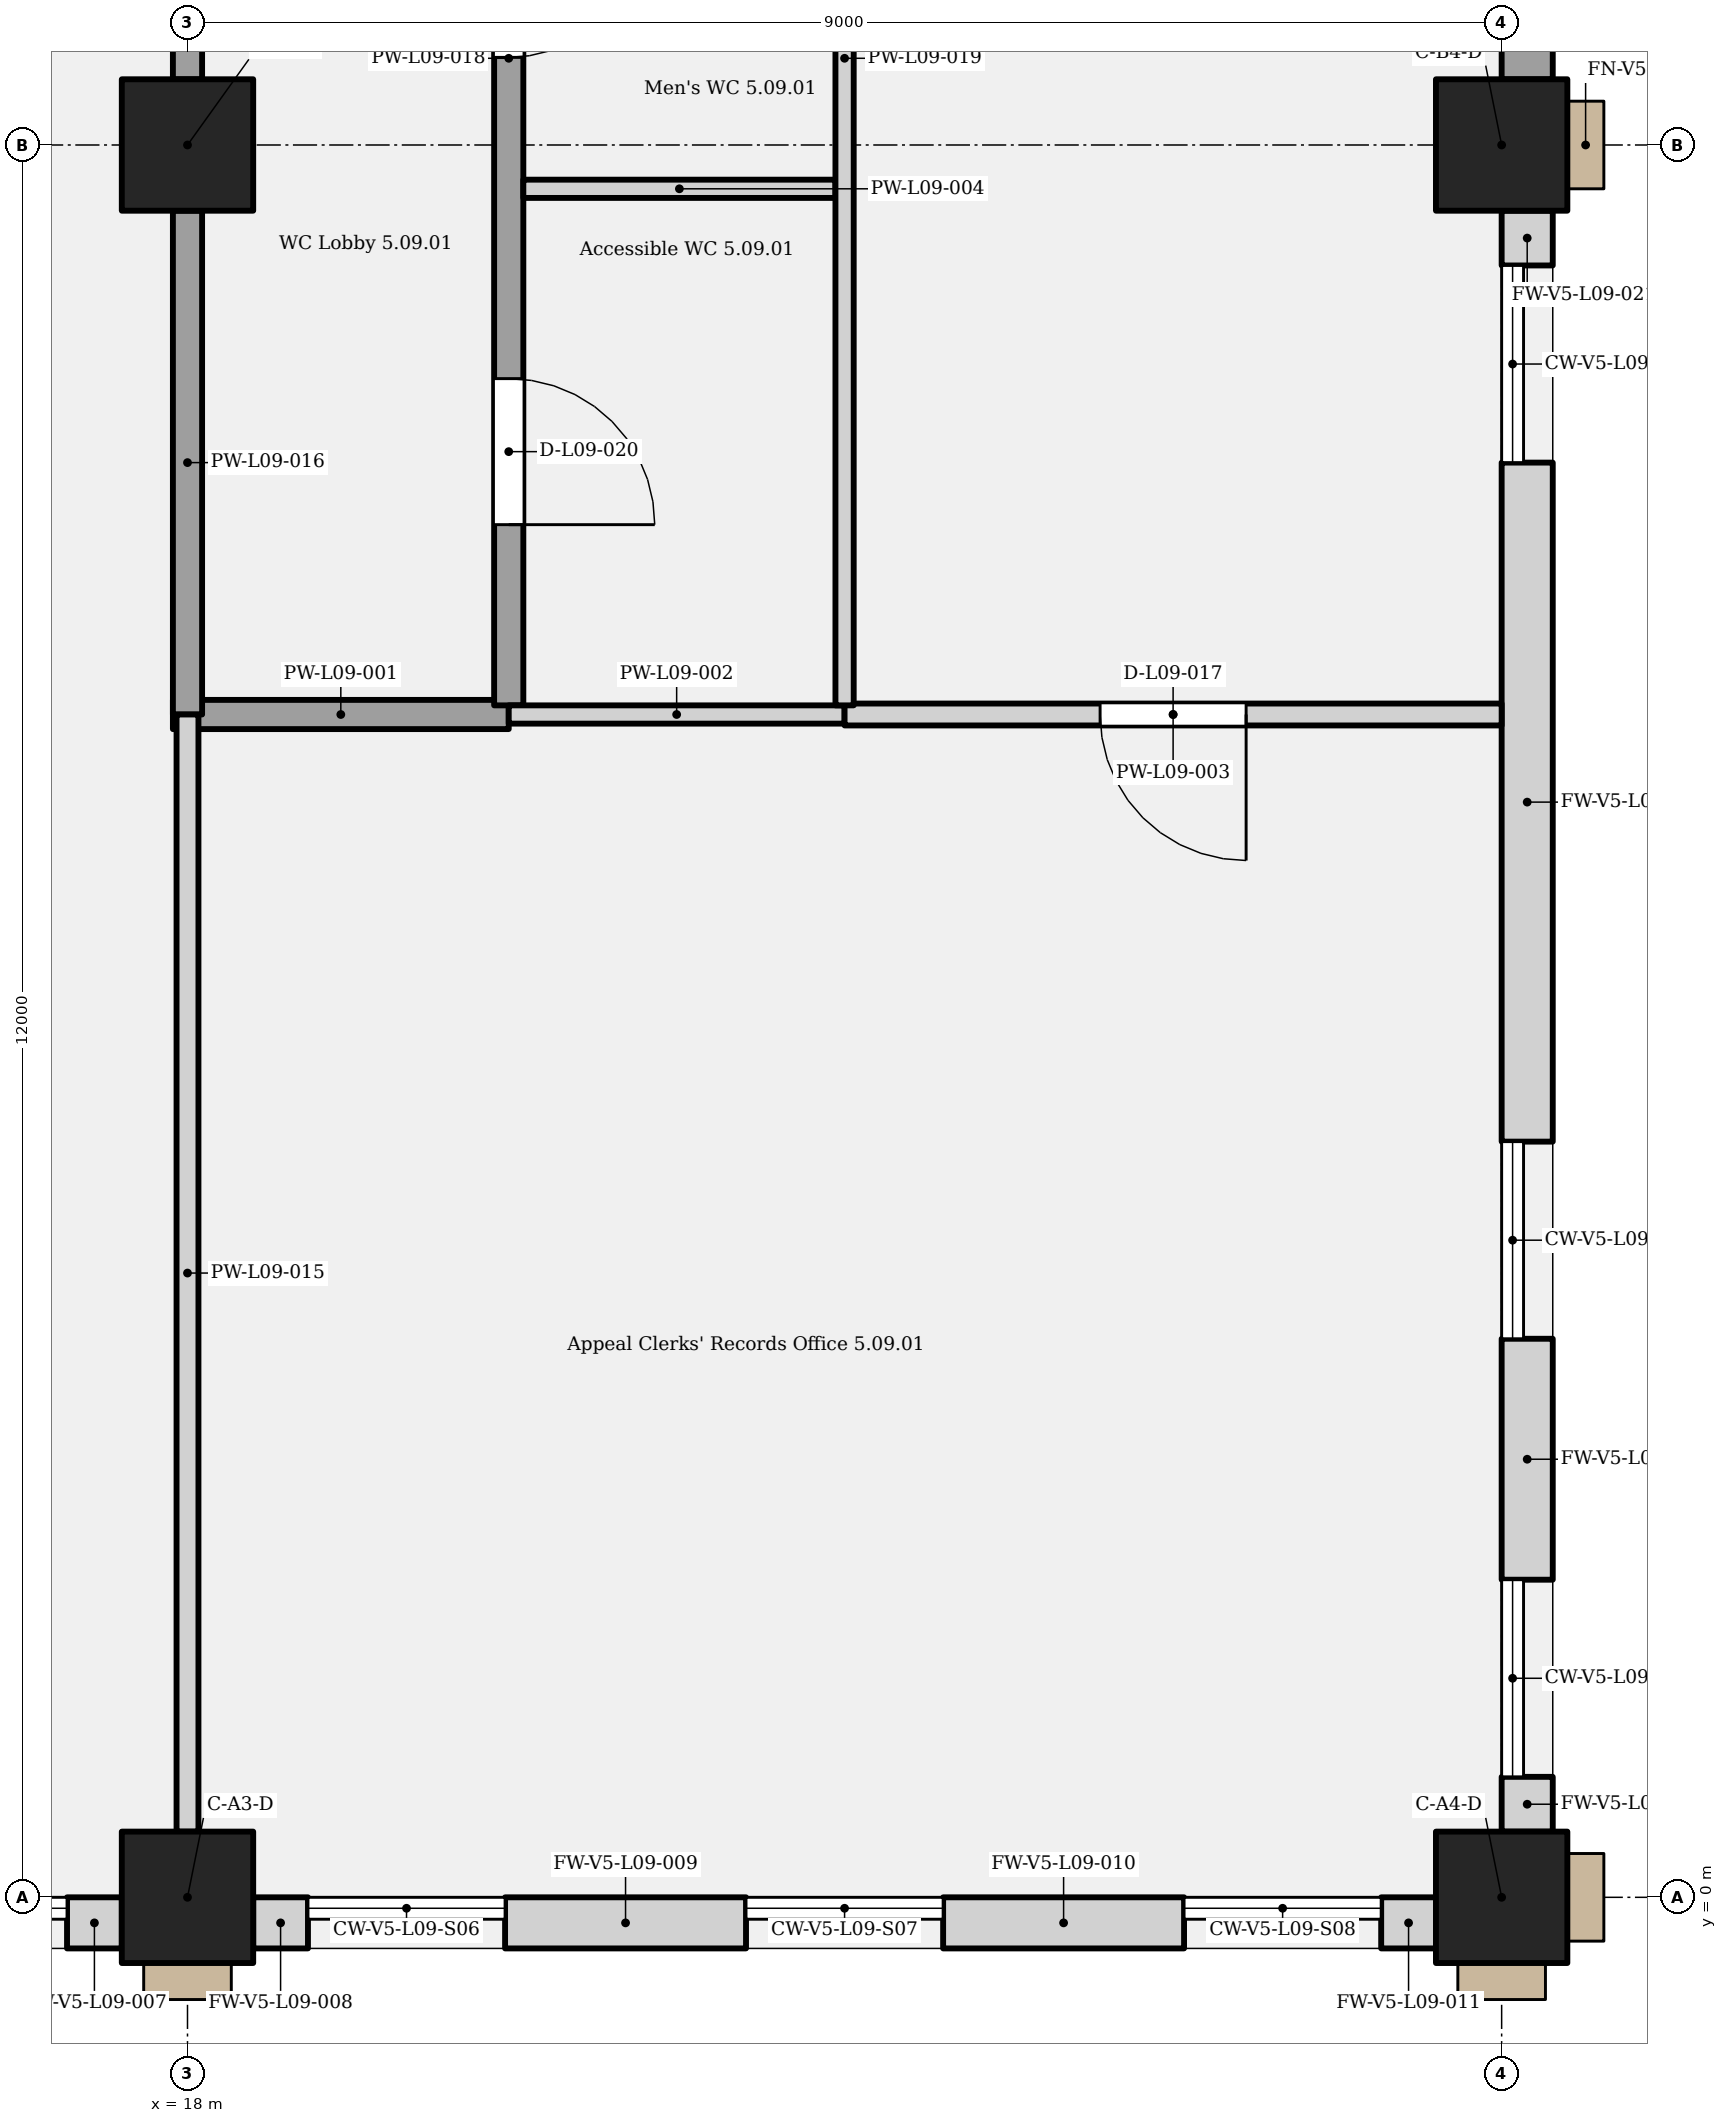
"""IFC4 building model, lengths in metres.
Left out: names, types, materials, properties, quantities, classifications, styles, units other than length and angle.
Written with IfcOpenShell. Run it as: python <this file> out.ifc"""

import sys

from ifc_helpers import new_model, si_unit, direction, frame, frame_2d, origin, origin_2d, place, context, subcontext, project, spatial, rectangle, extrude, element, fill, save


model = new_model("IFC4")
c1 = context("Model", 3, precision=1e-05, world=origin(), true_north=direction((0.0, 1.0)))
c2 = subcontext(c1, "Body", "Model", "MODEL_VIEW")
j1 = project(units=[si_unit("LENGTHUNIT", "METRE"), si_unit("PLANEANGLEUNIT", "RADIAN")], contexts=[c1])
p1 = place(None, origin())
s1 = spatial("IfcSite", under=j1, at=p1, CompositionType="ELEMENT")
p2 = place(p1, origin())
s2 = spatial("IfcBuilding", under=s1, at=p2, CompositionType="ELEMENT")
p3 = place(p2, frame((0.0, 0.0, 48.9)))
s3 = spatial("IfcBuildingStorey", under=s2, at=p3, CompositionType="ELEMENT", Elevation=48.9)
for number, where, z_axis, x_axis in (
    (1, (18.0, 0.0, 0.0), (0.0, 0.0, 1.0), (1.0, 0.0, 0.0)),
    (2, (27.0, 0.0, 0.0), (0.0, 0.0, 1.0), (1.0, 0.0, 0.0)),
    (3, (18.0, 12.0, 0.0), (0.0, 0.0, 1.0), (1.0, 0.0, 0.0)),
    (4, (27.0, 12.0, 0.0), (0.0, 0.0, 1.0), (1.0, 0.0, 0.0)),
):
    element("IfcColumn", number, at=place(p3, frame(where, z_axis=z_axis, x_axis=x_axis)), inside=s3, PredefinedType="COLUMN", context=c2, shape_type="SweptSolid", body=[
        extrude(rectangle(XDim=0.9, YDim=0.9, at=origin_2d()), origin(), (0.0, 0.0, 1.0), 4.5),
    ])
for number, where, z_axis, x_axis in (
    (5, (17.175, -0.175, 0.0), (0.0, 0.0, 1.0), (1.0, 0.0, 0.0)),
    (6, (18.45, -0.175, 0.0), (0.0, 0.0, 1.0), (1.0, 0.0, 0.0)),
):
    element("IfcWall", number, at=place(p3, frame(where, z_axis=z_axis, x_axis=x_axis)), inside=s3, PredefinedType="SOLIDWALL", context=c2, shape_type="SweptSolid", body=[
        extrude(rectangle(XDim=0.375, YDim=0.35, at=frame_2d((0.188, 0.0))), origin(), (0.0, 0.0, 1.0), 4.25),
    ])
for number, where, z_axis, x_axis in (
    (7, (20.175, -0.175, 0.0), (0.0, 0.0, 1.0), (1.0, 0.0, 0.0)),
    (8, (23.175, -0.175, 0.0), (0.0, 0.0, 1.0), (1.0, 0.0, 0.0)),
):
    element("IfcWall", number, at=place(p3, frame(where, z_axis=z_axis, x_axis=x_axis)), inside=s3, PredefinedType="SOLIDWALL", context=c2, shape_type="SweptSolid", body=[
        extrude(rectangle(XDim=1.65, YDim=0.35, at=frame_2d((0.825, 0.0))), origin(), (0.0, 0.0, 1.0), 4.25),
    ])
for number, where, z_axis, x_axis in (
    (9, (26.175, -0.175, 0.0), (0.0, 0.0, 1.0), (1.0, 0.0, 0.0)),
    (10, (27.175, 0.45, 0.0), (0.0, 0.0, 1.0), (0.0, 1.0, 0.0)),
):
    element("IfcWall", number, at=place(p3, frame(where, z_axis=z_axis, x_axis=x_axis)), inside=s3, PredefinedType="SOLIDWALL", context=c2, shape_type="SweptSolid", body=[
        extrude(rectangle(XDim=0.375, YDim=0.35, at=frame_2d((0.188, 0.0))), origin(), (0.0, 0.0, 1.0), 4.25),
    ])
p4 = place(p3, frame((27.175, 2.175, 0.0), z_axis=(0.0, 0.0, 1.0), x_axis=(0.0, 1.0, 0.0)))
e11 = element("IfcWall", 11, at=p4, inside=s3, PredefinedType="SOLIDWALL", context=c2, shape_type="SweptSolid", body=[
    extrude(rectangle(XDim=1.65, YDim=0.35, at=frame_2d((0.825, 0.0))), origin(), (0.0, 0.0, 1.0), 4.25),
])
p5 = place(p3, frame((27.175, 5.175, 0.0), z_axis=(0.0, 0.0, 1.0), x_axis=(0.0, 1.0, 0.0)))
e12 = element("IfcWall", 12, at=p5, inside=s3, PredefinedType="SOLIDWALL", context=c2, shape_type="SweptSolid", body=[
    extrude(rectangle(XDim=4.65, YDim=0.35, at=frame_2d((2.325, 0.0))), origin(), (0.0, 0.0, 1.0), 4.25),
])
p6 = place(p3, frame((27.175, 11.175, 0.0), z_axis=(0.0, 0.0, 1.0), x_axis=(0.0, 1.0, 0.0)))
e13 = element("IfcWall", 13, at=p6, inside=s3, PredefinedType="SOLIDWALL", context=c2, shape_type="SweptSolid", body=[
    extrude(rectangle(XDim=0.375, YDim=0.35, at=frame_2d((0.188, 0.0))), origin(), (0.0, 0.0, 1.0), 4.25),
])
p7 = place(p3, frame((27.175, 12.45, 0.0), z_axis=(0.0, 0.0, 1.0), x_axis=(0.0, 1.0, 0.0)))
e14 = element("IfcWall", 14, at=p7, inside=s3, PredefinedType="SOLIDWALL", context=c2, shape_type="SweptSolid", body=[
    extrude(rectangle(XDim=0.525, YDim=0.35, at=frame_2d((0.263, 0.0))), origin(), (0.0, 0.0, 1.0), 4.25),
])
p8 = place(p3, frame((17.9, 8.1, 0.0), z_axis=(0.0, 0.0, 1.0), x_axis=(1.0, 0.0, 0.0)))
e15 = element("IfcWall", 15, at=p8, inside=s3, PredefinedType="PARTITIONING", context=c2, shape_type="SweptSolid", body=[
    extrude(rectangle(XDim=2.3, YDim=0.2, at=frame_2d((1.15, 0.0))), origin(), (0.0, 0.0, 1.0), 4.25),
])
p9 = place(p3, frame((20.2, 8.1, 0.0), z_axis=(0.0, 0.0, 1.0), x_axis=(1.0, 0.0, 0.0)))
e16 = element("IfcWall", 16, at=p9, inside=s3, PredefinedType="PARTITIONING", context=c2, shape_type="SweptSolid", body=[
    extrude(rectangle(XDim=2.3, YDim=0.125, at=frame_2d((1.15, 0.0))), origin(), (0.0, 0.0, 1.0), 4.25),
])
p10 = place(p3, frame((22.5, 8.1, 0.0), z_axis=(0.0, 0.0, 1.0), x_axis=(1.0, 0.0, 0.0)))
e17 = element("IfcWall", 17, at=p10, inside=s3, PredefinedType="PARTITIONING", context=c2, shape_type="SweptSolid", body=[
    extrude(rectangle(XDim=4.5, YDim=0.15, at=frame_2d((2.25, 0.0))), origin(), (0.0, 0.0, 1.0), 4.25),
])
p11 = place(p10, frame((2.75, 0.0, 0.0), z_axis=(0.0, 0.0, 1.0), x_axis=(-1.0, 0.0, 0.0)))
e18 = element("IfcOpeningElement", 18, at=p11, cuts=e17, PredefinedType="OPENING", context=c2, shape_type="SweptSolid", body=[
    extrude(rectangle(XDim=1.0, YDim=2.1, at=frame_2d((0.5, 1.05))), frame((0.0, 0.085, 0.0), z_axis=(0.0, -1.0, 0.0), x_axis=(1.0, 0.0, 0.0)), (0.0, 0.0, 1.0), 0.17),
])
p12 = place(p3, frame((20.3, 11.7, 0.0), z_axis=(0.0, 0.0, 1.0), x_axis=(1.0, 0.0, 0.0)))
e19 = element("IfcWall", 19, at=p12, inside=s3, PredefinedType="PARTITIONING", context=c2, shape_type="SweptSolid", body=[
    extrude(rectangle(XDim=2.137, YDim=0.125, at=frame_2d((1.069, 0.0))), origin(), (0.0, 0.0, 1.0), 3.5),
])
p13 = place(p3, frame((18.0, 0.45, 0.0), z_axis=(0.0, 0.0, 1.0), x_axis=(0.0, 1.0, 0.0)))
e20 = element("IfcWall", 20, at=p13, inside=s3, PredefinedType="PARTITIONING", context=c2, shape_type="SweptSolid", body=[
    extrude(rectangle(XDim=7.65, YDim=0.15, at=frame_2d((3.825, 0.0))), origin(), (0.0, 0.0, 1.0), 3.5),
])
p14 = place(p3, frame((18.0, 8.1, 0.0), z_axis=(0.0, 0.0, 1.0), x_axis=(0.0, 1.0, 0.0)))
e21 = element("IfcWall", 21, at=p14, inside=s3, PredefinedType="PARTITIONING", context=c2, shape_type="SweptSolid", body=[
    extrude(rectangle(XDim=3.45, YDim=0.2, at=frame_2d((1.725, 0.0))), origin(), (0.0, 0.0, 1.0), 3.5),
])
p15 = place(p3, frame((18.0, 12.45, 0.0), z_axis=(0.0, 0.0, 1.0), x_axis=(0.0, 1.0, 0.0)))
e22 = element("IfcWall", 22, at=p15, inside=s3, PredefinedType="PARTITIONING", context=c2, shape_type="SweptSolid", body=[
    extrude(rectangle(XDim=4.575, YDim=0.2, at=frame_2d((2.288, 0.0))), origin(), (0.0, 0.0, 1.0), 3.3),
])
p16 = place(p3, frame((20.2, 8.163, 0.0), z_axis=(0.0, 0.0, 1.0), x_axis=(0.0, 1.0, 0.0)))
e23 = element("IfcWall", 23, at=p16, inside=s3, PredefinedType="PARTITIONING", context=c2, shape_type="SweptSolid", body=[
    extrude(rectangle(XDim=8.862, YDim=0.2, at=frame_2d((4.431, 0.0))), origin(), (0.0, 0.0, 1.0), 4.25),
])
p17 = place(p16, frame((8.037, 0.0, 0.0), z_axis=(0.0, 0.0, 1.0), x_axis=(-1.0, 0.0, 0.0)))
e24 = element("IfcOpeningElement", 24, at=p17, cuts=e23, PredefinedType="OPENING", context=c2, shape_type="SweptSolid", body=[
    extrude(rectangle(XDim=0.9, YDim=2.1, at=frame_2d((0.45, 1.05))), frame((0.0, 0.11, 0.0), z_axis=(0.0, -1.0, 0.0), x_axis=(1.0, 0.0, 0.0)), (0.0, 0.0, 1.0), 0.22),
])
p18 = place(p16, frame((5.337, 0.0, 0.0), z_axis=(0.0, 0.0, 1.0), x_axis=(-1.0, 0.0, 0.0)))
e25 = element("IfcOpeningElement", 25, at=p18, cuts=e23, PredefinedType="OPENING", context=c2, shape_type="SweptSolid", body=[
    extrude(rectangle(XDim=0.9, YDim=2.1, at=frame_2d((0.45, 1.05))), frame((0.0, 0.11, 0.0), z_axis=(0.0, -1.0, 0.0), x_axis=(1.0, 0.0, 0.0)), (0.0, 0.0, 1.0), 0.22),
])
p19 = place(p16, frame((2.238, 0.0, 0.0), z_axis=(0.0, 0.0, 1.0), x_axis=(-1.0, 0.0, 0.0)))
e26 = element("IfcOpeningElement", 26, at=p19, cuts=e23, PredefinedType="OPENING", context=c2, shape_type="SweptSolid", body=[
    extrude(rectangle(XDim=1.0, YDim=2.1, at=frame_2d((0.5, 1.05))), frame((0.0, 0.11, 0.0), z_axis=(0.0, -1.0, 0.0), x_axis=(1.0, 0.0, 0.0)), (0.0, 0.0, 1.0), 0.22),
])
p20 = place(p3, frame((22.5, 8.163, 0.0), z_axis=(0.0, 0.0, 1.0), x_axis=(0.0, 1.0, 0.0)))
e27 = element("IfcWall", 27, at=p20, inside=s3, PredefinedType="PARTITIONING", context=c2, shape_type="SweptSolid", body=[
    extrude(rectangle(XDim=8.862, YDim=0.125, at=frame_2d((4.431, 0.0))), origin(), (0.0, 0.0, 1.0), 4.25),
])
p21 = place(p11, origin())
e28 = element("IfcDoor", 28, at=p21, inside=s3, OperationType="SINGLE_SWING_LEFT", PredefinedType="DOOR", context=c2, shape_type="SweptSolid", body=[
    extrude(rectangle(XDim=1.0, YDim=2.1, at=frame_2d((0.5, 1.05))), frame((0.0, 0.025, 0.0), z_axis=(0.0, -1.0, 0.0), x_axis=(1.0, 0.0, 0.0)), (0.0, 0.0, 1.0), 0.05),
])
fill(e18, e28)
p22 = place(p18, origin())
e29 = element("IfcDoor", 29, at=p22, inside=s3, OperationType="SINGLE_SWING_LEFT", PredefinedType="DOOR", context=c2, shape_type="SweptSolid", body=[
    extrude(rectangle(XDim=0.9, YDim=2.1, at=frame_2d((0.45, 1.05))), frame((0.0, 0.025, 0.0), z_axis=(0.0, -1.0, 0.0), x_axis=(1.0, 0.0, 0.0)), (0.0, 0.0, 1.0), 0.05),
])
fill(e25, e29)
p23 = place(p19, origin())
e30 = element("IfcDoor", 30, at=p23, inside=s3, OperationType="SINGLE_SWING_RIGHT", PredefinedType="DOOR", context=c2, shape_type="SweptSolid", body=[
    extrude(rectangle(XDim=1.0, YDim=2.1, at=frame_2d((0.5, 1.05))), frame((0.0, 0.025, 0.0), z_axis=(0.0, -1.0, 0.0), x_axis=(1.0, 0.0, 0.0)), (0.0, 0.0, 1.0), 0.05),
])
fill(e26, e30)
save(model, sys.argv[1])
